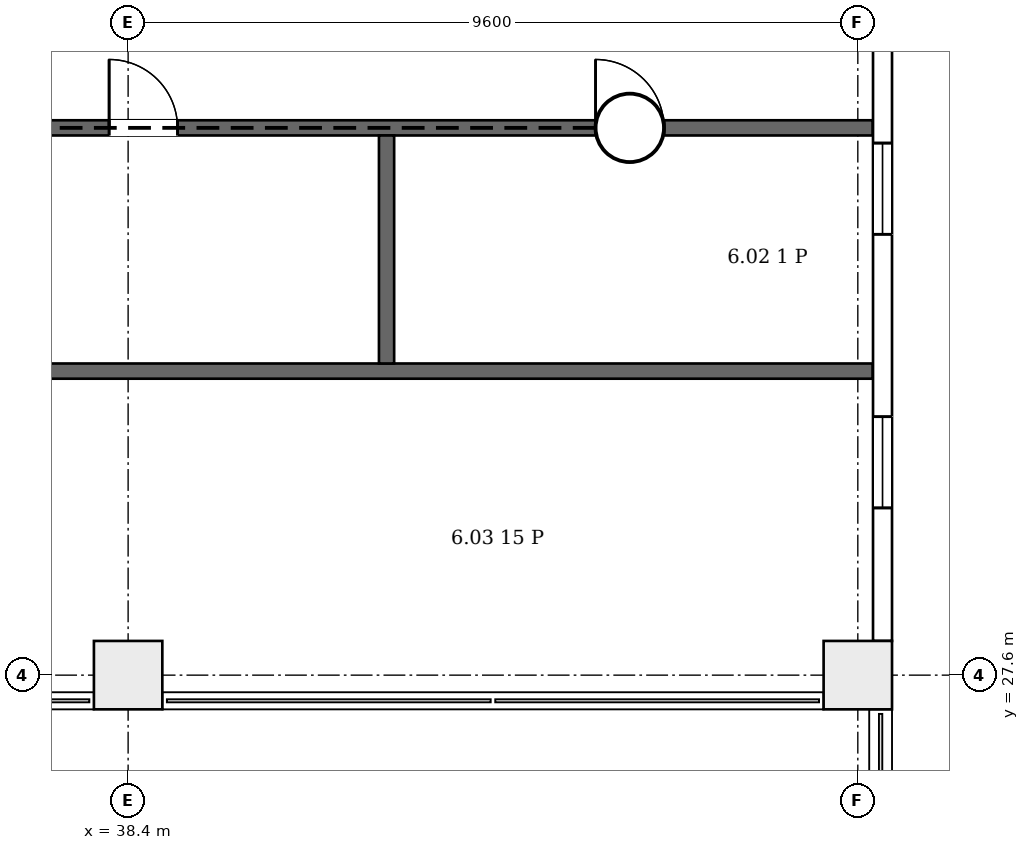
"""IFC4 building model, lengths in metres.
Left out: names, types, materials, properties, quantities, classifications, styles, units other than length and angle.
Written with IfcOpenShell. Run it as: python <this file> out.ifc"""

import sys

from ifc_helpers import new_model, si_unit, direction, frame, frame_2d, origin, origin_2d, place, context, subcontext, project, spatial, rectangle, extrude, element, fill, save


model = new_model("IFC4")
c1 = context("Model", 3, precision=1e-05, world=origin(), true_north=direction((0.0, 1.0)))
c2 = subcontext(c1, "Body", "Model", "MODEL_VIEW")
j1 = project(units=[si_unit("LENGTHUNIT", "METRE"), si_unit("PLANEANGLEUNIT", "RADIAN")], contexts=[c1])
p1 = place(None, origin())
s1 = spatial("IfcSite", under=j1, at=p1, CompositionType="ELEMENT")
p2 = place(p1, origin())
s2 = spatial("IfcBuilding", under=s1, at=p2, CompositionType="ELEMENT")
p3 = place(p2, frame((0.0, 0.0, 36.1)))
s3 = spatial("IfcBuildingStorey", under=s2, at=p3, CompositionType="ELEMENT", Elevation=36.1)
for number, where, z_axis, x_axis in (
    (1, (38.4, 27.6, 0.0), (0.0, 0.0, 1.0), (1.0, 0.0, 0.0)),
    (2, (48.0, 27.6, 0.0), (0.0, 0.0, 1.0), (1.0, 0.0, 0.0)),
):
    element("IfcColumn", number, at=place(p3, frame(where, z_axis=z_axis, x_axis=x_axis)), inside=s3, PredefinedType="COLUMN", context=c2, shape_type="SweptSolid", body=[
        extrude(rectangle(XDim=0.9, YDim=0.9, at=origin_2d()), origin(), (0.0, 0.0, 1.0), 4.2),
    ])
p4 = place(p3, frame((48.325, 28.05, 0.0), z_axis=(0.0, 0.0, 1.0), x_axis=(0.0, 1.0, 0.0)))
e3 = element("IfcWall", 3, at=p4, inside=s3, PredefinedType="ELEMENTEDWALL", context=c2, shape_type="SweptSolid", body=[
    extrude(rectangle(XDim=8.3, YDim=0.25, at=frame_2d((4.15, 0.0))), origin(), (0.0, 0.0, 1.0), 3.9),
])
p5 = place(p4, frame((1.75, 0.0, 0.9)))
e4 = element("IfcOpeningElement", 4, at=p5, cuts=e3, PredefinedType="OPENING", context=c2, shape_type="SweptSolid", body=[
    extrude(rectangle(XDim=1.2, YDim=2.6, at=frame_2d((0.6, 1.3))), frame((0.0, 0.135, 0.0), z_axis=(0.0, -1.0, 0.0), x_axis=(1.0, 0.0, 0.0)), (0.0, 0.0, 1.0), 0.27),
])
p6 = place(p4, frame((5.35, 0.0, 0.9)))
e5 = element("IfcOpeningElement", 5, at=p6, cuts=e3, PredefinedType="OPENING", context=c2, shape_type="SweptSolid", body=[
    extrude(rectangle(XDim=1.2, YDim=2.6, at=frame_2d((0.6, 1.3))), frame((0.0, 0.135, 0.0), z_axis=(0.0, -1.0, 0.0), x_axis=(1.0, 0.0, 0.0)), (0.0, 0.0, 1.0), 0.27),
])
p7 = place(p3, frame((35.406, 31.6, 0.0), z_axis=(0.0, 0.0, 1.0), x_axis=(1.0, 0.0, 0.0)))
e6 = element("IfcWall", 6, at=p7, inside=s3, PredefinedType="PARTITIONING", context=c2, shape_type="SweptSolid", body=[
    extrude(rectangle(XDim=12.788, YDim=0.2, at=frame_2d((6.394, 0.0))), origin(), (0.0, 0.0, 1.0), 3.9),
])
p8 = place(p3, frame((35.406, 34.8, 0.0), z_axis=(0.0, 0.0, 1.0), x_axis=(1.0, 0.0, 0.0)))
e7 = element("IfcWall", 7, at=p8, inside=s3, PredefinedType="PARTITIONING", context=c2, shape_type="SweptSolid", body=[
    extrude(rectangle(XDim=12.788, YDim=0.2, at=frame_2d((6.394, 0.0))), origin(), (0.0, 0.0, 1.0), 3.9),
])
p9 = place(p8, frame((2.744, 0.0, 0.0)))
e8 = element("IfcOpeningElement", 8, at=p9, cuts=e7, PredefinedType="OPENING", context=c2, shape_type="SweptSolid", body=[
    extrude(rectangle(XDim=0.9, YDim=2.1, at=frame_2d((0.45, 1.05))), frame((0.0, 0.11, 0.0), z_axis=(0.0, -1.0, 0.0), x_axis=(1.0, 0.0, 0.0)), (0.0, 0.0, 1.0), 0.22),
])
p10 = place(p8, frame((9.144, 0.0, 0.0)))
e9 = element("IfcOpeningElement", 9, at=p10, cuts=e7, PredefinedType="OPENING", context=c2, shape_type="SweptSolid", body=[
    extrude(rectangle(XDim=0.9, YDim=2.1, at=frame_2d((0.45, 1.05))), frame((0.0, 0.11, 0.0), z_axis=(0.0, -1.0, 0.0), x_axis=(1.0, 0.0, 0.0)), (0.0, 0.0, 1.0), 0.22),
])
p11 = place(p3, frame((41.8, 31.7, 0.0), z_axis=(0.0, 0.0, 1.0), x_axis=(0.0, 1.0, 0.0)))
e10 = element("IfcWall", 10, at=p11, inside=s3, PredefinedType="PARTITIONING", context=c2, shape_type="SweptSolid", body=[
    extrude(rectangle(XDim=3.0, YDim=0.2, at=frame_2d((1.5, 0.0))), origin(), (0.0, 0.0, 1.0), 3.9),
])
p12 = place(p5, origin())
e11 = element("IfcWindow", 11, at=p12, inside=s3, PartitioningType="SINGLE_PANEL", PredefinedType="WINDOW", context=c2, shape_type="SweptSolid", body=[
    extrude(rectangle(XDim=1.2, YDim=2.6, at=frame_2d((0.6, 1.3))), frame((0.0, 0.03, 0.0), z_axis=(0.0, -1.0, 0.0), x_axis=(1.0, 0.0, 0.0)), (0.0, 0.0, 1.0), 0.06),
])
fill(e4, e11)
p13 = place(p6, origin())
e12 = element("IfcWindow", 12, at=p13, inside=s3, PartitioningType="SINGLE_PANEL", PredefinedType="WINDOW", context=c2, shape_type="SweptSolid", body=[
    extrude(rectangle(XDim=1.2, YDim=2.6, at=frame_2d((0.6, 1.3))), frame((0.0, 0.03, 0.0), z_axis=(0.0, -1.0, 0.0), x_axis=(1.0, 0.0, 0.0)), (0.0, 0.0, 1.0), 0.06),
])
fill(e5, e12)
p14 = place(p9, origin())
e13 = element("IfcDoor", 13, at=p14, inside=s3, OperationType="SINGLE_SWING_RIGHT", PredefinedType="DOOR", context=c2, shape_type="SweptSolid", body=[
    extrude(rectangle(XDim=0.9, YDim=2.1, at=frame_2d((0.45, 1.05))), frame((0.0, 0.025, 0.0), z_axis=(0.0, -1.0, 0.0), x_axis=(1.0, 0.0, 0.0)), (0.0, 0.0, 1.0), 0.05),
])
fill(e8, e13)
p15 = place(p10, origin())
e14 = element("IfcDoor", 14, at=p15, inside=s3, OperationType="SINGLE_SWING_LEFT", PredefinedType="DOOR", context=c2, shape_type="SweptSolid", body=[
    extrude(rectangle(XDim=0.9, YDim=2.1, at=frame_2d((0.45, 1.05))), frame((0.0, 0.025, 0.0), z_axis=(0.0, -1.0, 0.0), x_axis=(1.0, 0.0, 0.0)), (0.0, 0.0, 1.0), 0.05),
])
fill(e9, e14)
save(model, sys.argv[1])
